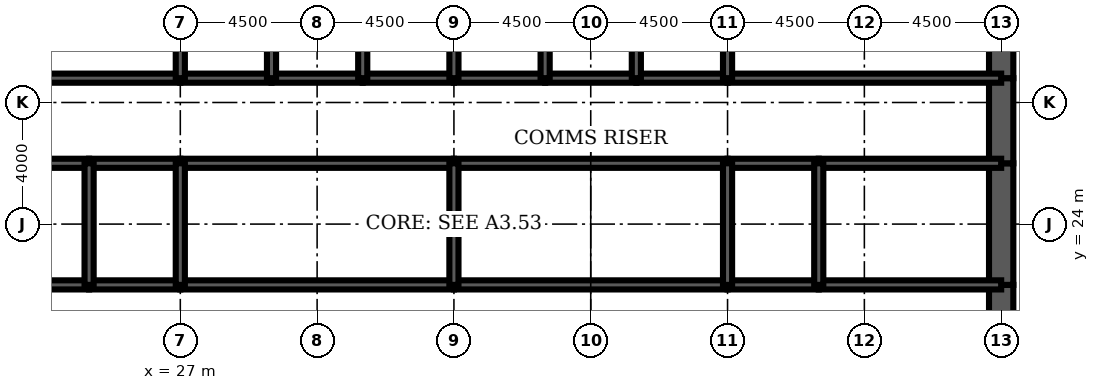
"""IFC4 building model, lengths in metres.
Left out: names, types, materials, properties, quantities, classifications, styles, units other than length and angle.
Written with IfcOpenShell. Run it as: python <this file> out.ifc"""

import sys

from ifc_helpers import new_model, si_unit, direction, frame, frame_2d, origin, place, context, subcontext, project, spatial, rectangle, extrude, element, fill, save


model = new_model("IFC4")
c1 = context("Model", 3, precision=1e-05, world=origin(), true_north=direction((0.0, 1.0)))
c2 = subcontext(c1, "Body", "Model", "MODEL_VIEW")
j1 = project(units=[si_unit("LENGTHUNIT", "METRE"), si_unit("PLANEANGLEUNIT", "RADIAN")], contexts=[c1])
p1 = place(None, origin())
s1 = spatial("IfcSite", under=j1, at=p1, CompositionType="ELEMENT")
p2 = place(p1, origin())
s2 = spatial("IfcBuilding", under=s1, at=p2, CompositionType="ELEMENT")
p3 = place(p2, frame((0.0, 0.0, 227.8)))
s3 = spatial("IfcBuildingStorey", under=s2, at=p3, CompositionType="ELEMENT", Elevation=227.8)
p4 = place(p3, frame((54.0, 19.2, 0.0), z_axis=(0.0, 0.0, 1.0), x_axis=(0.0, 1.0, 0.0)))
e1 = element("IfcWall", 1, at=p4, inside=s3, PredefinedType="SHEAR", context=c2, shape_type="SweptSolid", body=[
    extrude(rectangle(XDim=2.8, YDim=0.8, at=frame_2d((1.4, 0.0))), origin(), (0.0, 0.0, 1.0), 4.2),
])
p5 = place(p4, frame((0.4, 0.0, 0.0)))
e2 = element("IfcOpeningElement", 2, at=p5, cuts=e1, PredefinedType="OPENING", context=c2, shape_type="SweptSolid", body=[
    extrude(rectangle(XDim=1.8, YDim=2.1, at=frame_2d((0.9, 1.05))), frame((0.0, 0.41, 0.0), z_axis=(0.0, -1.0, 0.0), x_axis=(1.0, 0.0, 0.0)), (0.0, 0.0, 1.0), 0.82),
])
p6 = place(p3, frame((54.0, 22.0, 0.0), z_axis=(0.0, 0.0, 1.0), x_axis=(0.0, 1.0, 0.0)))
e3 = element("IfcWall", 3, at=p6, inside=s3, PredefinedType="SHEAR", context=c2, shape_type="SweptSolid", body=[
    extrude(rectangle(XDim=4.0, YDim=0.8, at=frame_2d((2.0, 0.0))), origin(), (0.0, 0.0, 1.0), 4.2),
])
p7 = place(p3, frame((54.0, 26.0, 0.0), z_axis=(0.0, 0.0, 1.0), x_axis=(0.0, 1.0, 0.0)))
e4 = element("IfcWall", 4, at=p7, inside=s3, PredefinedType="SHEAR", context=c2, shape_type="SweptSolid", body=[
    extrude(rectangle(XDim=2.8, YDim=0.8, at=frame_2d((1.4, 0.0))), origin(), (0.0, 0.0, 1.0), 4.2),
])
p8 = place(p7, frame((0.6, 0.0, 0.0)))
e5 = element("IfcOpeningElement", 5, at=p8, cuts=e4, PredefinedType="OPENING", context=c2, shape_type="SweptSolid", body=[
    extrude(rectangle(XDim=1.8, YDim=2.1, at=frame_2d((0.9, 1.05))), frame((0.0, 0.41, 0.0), z_axis=(0.0, -1.0, 0.0), x_axis=(1.0, 0.0, 0.0)), (0.0, 0.0, 1.0), 0.82),
])
p9 = place(p3, frame((54.0, 28.8, 0.0), z_axis=(0.0, 0.0, 1.0), x_axis=(0.0, 1.0, 0.0)))
e6 = element("IfcWall", 6, at=p9, inside=s3, PredefinedType="SHEAR", context=c2, shape_type="SweptSolid", body=[
    extrude(rectangle(XDim=3.2, YDim=0.8, at=frame_2d((1.6, 0.0))), origin(), (0.0, 0.0, 1.0), 4.2),
])
p10 = place(p3, frame((18.0, 28.8, 0.0), z_axis=(0.0, 0.0, 1.0), x_axis=(1.0, 0.0, 0.0)))
e7 = element("IfcWall", 7, at=p10, inside=s3, PredefinedType="SOLIDWALL", context=c2, shape_type="SweptSolid", body=[
    extrude(rectangle(XDim=9.0, YDim=0.3, at=frame_2d((4.5, 0.0))), origin(), (0.0, 0.0, 1.0), 4.2),
])
p11 = place(p10, frame((0.65, 0.0, 0.0)))
e8 = element("IfcOpeningElement", 8, at=p11, cuts=e7, PredefinedType="OPENING", context=c2, shape_type="SweptSolid", body=[
    extrude(rectangle(XDim=1.0, YDim=2.1, at=frame_2d((0.5, 1.05))), frame((0.0, 0.16, 0.0), z_axis=(0.0, -1.0, 0.0), x_axis=(1.0, 0.0, 0.0)), (0.0, 0.0, 1.0), 0.32),
])
p12 = place(p3, frame((27.0, 28.8, 0.0), z_axis=(0.0, 0.0, 1.0), x_axis=(1.0, 0.0, 0.0)))
e9 = element("IfcWall", 9, at=p12, inside=s3, PredefinedType="SOLIDWALL", context=c2, shape_type="SweptSolid", body=[
    extrude(rectangle(XDim=3.0, YDim=0.3, at=frame_2d((1.5, 0.0))), origin(), (0.0, 0.0, 1.0), 4.2),
])
p13 = place(p12, frame((0.95, 0.0, 0.0)))
e10 = element("IfcOpeningElement", 10, at=p13, cuts=e9, PredefinedType="OPENING", context=c2, shape_type="SweptSolid", body=[
    extrude(rectangle(XDim=1.1, YDim=2.2, at=frame_2d((0.55, 1.1))), frame((0.0, 0.16, 0.0), z_axis=(0.0, -1.0, 0.0), x_axis=(1.0, 0.0, 0.0)), (0.0, 0.0, 1.0), 0.32),
])
p14 = place(p3, frame((30.0, 28.8, 0.0), z_axis=(0.0, 0.0, 1.0), x_axis=(1.0, 0.0, 0.0)))
e11 = element("IfcWall", 11, at=p14, inside=s3, PredefinedType="SOLIDWALL", context=c2, shape_type="SweptSolid", body=[
    extrude(rectangle(XDim=3.0, YDim=0.3, at=frame_2d((1.5, 0.0))), origin(), (0.0, 0.0, 1.0), 4.2),
])
p15 = place(p14, frame((0.95, 0.0, 0.0)))
e12 = element("IfcOpeningElement", 12, at=p15, cuts=e11, PredefinedType="OPENING", context=c2, shape_type="SweptSolid", body=[
    extrude(rectangle(XDim=1.1, YDim=2.2, at=frame_2d((0.55, 1.1))), frame((0.0, 0.16, 0.0), z_axis=(0.0, -1.0, 0.0), x_axis=(1.0, 0.0, 0.0)), (0.0, 0.0, 1.0), 0.32),
])
p16 = place(p3, frame((33.0, 28.8, 0.0), z_axis=(0.0, 0.0, 1.0), x_axis=(1.0, 0.0, 0.0)))
e13 = element("IfcWall", 13, at=p16, inside=s3, PredefinedType="SOLIDWALL", context=c2, shape_type="SweptSolid", body=[
    extrude(rectangle(XDim=3.0, YDim=0.3, at=frame_2d((1.5, 0.0))), origin(), (0.0, 0.0, 1.0), 4.2),
])
p17 = place(p16, frame((0.95, 0.0, 0.0)))
e14 = element("IfcOpeningElement", 14, at=p17, cuts=e13, PredefinedType="OPENING", context=c2, shape_type="SweptSolid", body=[
    extrude(rectangle(XDim=1.1, YDim=2.2, at=frame_2d((0.55, 1.1))), frame((0.0, 0.16, 0.0), z_axis=(0.0, -1.0, 0.0), x_axis=(1.0, 0.0, 0.0)), (0.0, 0.0, 1.0), 0.32),
])
for number, where, z_axis, x_axis in (
    (15, (36.0, 28.8, 0.0), (0.0, 0.0, 1.0), (1.0, 0.0, 0.0)),
    (16, (39.0, 28.8, 0.0), (0.0, 0.0, 1.0), (1.0, 0.0, 0.0)),
):
    element("IfcWall", number, at=place(p3, frame(where, z_axis=z_axis, x_axis=x_axis)), inside=s3, PredefinedType="SOLIDWALL", context=c2, shape_type="SweptSolid", body=[
        extrude(rectangle(XDim=3.0, YDim=0.3, at=frame_2d((1.5, 0.0))), origin(), (0.0, 0.0, 1.0), 4.2),
    ])
p18 = place(p3, frame((42.0, 28.8, 0.0), z_axis=(0.0, 0.0, 1.0), x_axis=(1.0, 0.0, 0.0)))
e17 = element("IfcWall", 17, at=p18, inside=s3, PredefinedType="SOLIDWALL", context=c2, shape_type="SweptSolid", body=[
    extrude(rectangle(XDim=3.0, YDim=0.3, at=frame_2d((1.5, 0.0))), origin(), (0.0, 0.0, 1.0), 4.2),
])
p19 = place(p18, frame((0.95, 0.0, 0.0)))
e18 = element("IfcOpeningElement", 18, at=p19, cuts=e17, PredefinedType="OPENING", context=c2, shape_type="SweptSolid", body=[
    extrude(rectangle(XDim=1.1, YDim=2.2, at=frame_2d((0.55, 1.1))), frame((0.0, 0.16, 0.0), z_axis=(0.0, -1.0, 0.0), x_axis=(1.0, 0.0, 0.0)), (0.0, 0.0, 1.0), 0.32),
])
p20 = place(p3, frame((45.0, 28.8, 0.0), z_axis=(0.0, 0.0, 1.0), x_axis=(1.0, 0.0, 0.0)))
e19 = element("IfcWall", 19, at=p20, inside=s3, PredefinedType="SOLIDWALL", context=c2, shape_type="SweptSolid", body=[
    extrude(rectangle(XDim=9.0, YDim=0.3, at=frame_2d((4.5, 0.0))), origin(), (0.0, 0.0, 1.0), 4.2),
])
p21 = place(p20, frame((7.35, 0.0, 0.0)))
e20 = element("IfcOpeningElement", 20, at=p21, cuts=e19, PredefinedType="OPENING", context=c2, shape_type="SweptSolid", body=[
    extrude(rectangle(XDim=1.0, YDim=2.1, at=frame_2d((0.5, 1.05))), frame((0.0, 0.16, 0.0), z_axis=(0.0, -1.0, 0.0), x_axis=(1.0, 0.0, 0.0)), (0.0, 0.0, 1.0), 0.32),
])
p22 = place(p3, frame((18.0, 22.0, 0.0), z_axis=(0.0, 0.0, 1.0), x_axis=(1.0, 0.0, 0.0)))
e21 = element("IfcWall", 21, at=p22, inside=s3, PredefinedType="SOLIDWALL", context=c2, shape_type="SweptSolid", body=[
    extrude(rectangle(XDim=6.0, YDim=0.3, at=frame_2d((3.0, 0.0))), origin(), (0.0, 0.0, 1.0), 4.2),
])
p23 = place(p22, frame((4.4, 0.0, 0.0)))
e22 = element("IfcOpeningElement", 22, at=p23, cuts=e21, PredefinedType="OPENING", context=c2, shape_type="SweptSolid", body=[
    extrude(rectangle(XDim=1.0, YDim=2.1, at=frame_2d((0.5, 1.05))), frame((0.0, 0.16, 0.0), z_axis=(0.0, -1.0, 0.0), x_axis=(1.0, 0.0, 0.0)), (0.0, 0.0, 1.0), 0.32),
])
p24 = place(p22, frame((0.65, 0.0, 0.0)))
e23 = element("IfcOpeningElement", 23, at=p24, cuts=e21, PredefinedType="OPENING", context=c2, shape_type="SweptSolid", body=[
    extrude(rectangle(XDim=1.0, YDim=2.1, at=frame_2d((0.5, 1.05))), frame((0.0, 0.16, 0.0), z_axis=(0.0, -1.0, 0.0), x_axis=(1.0, 0.0, 0.0)), (0.0, 0.0, 1.0), 0.32),
])
p25 = place(p3, frame((24.0, 22.0, 0.0), z_axis=(0.0, 0.0, 1.0), x_axis=(1.0, 0.0, 0.0)))
e24 = element("IfcWall", 24, at=p25, inside=s3, PredefinedType="SOLIDWALL", context=c2, shape_type="SweptSolid", body=[
    extrude(rectangle(XDim=3.0, YDim=0.3, at=frame_2d((1.5, 0.0))), origin(), (0.0, 0.0, 1.0), 4.2),
])
p26 = place(p25, frame((1.0, 0.0, 0.0)))
e25 = element("IfcOpeningElement", 25, at=p26, cuts=e24, PredefinedType="OPENING", context=c2, shape_type="SweptSolid", body=[
    extrude(rectangle(XDim=1.0, YDim=2.1, at=frame_2d((0.5, 1.05))), frame((0.0, 0.16, 0.0), z_axis=(0.0, -1.0, 0.0), x_axis=(1.0, 0.0, 0.0)), (0.0, 0.0, 1.0), 0.32),
])
p27 = place(p3, frame((27.0, 22.0, 0.0), z_axis=(0.0, 0.0, 1.0), x_axis=(1.0, 0.0, 0.0)))
e26 = element("IfcWall", 26, at=p27, inside=s3, PredefinedType="SOLIDWALL", context=c2, shape_type="SweptSolid", body=[
    extrude(rectangle(XDim=9.0, YDim=0.3, at=frame_2d((4.5, 0.0))), origin(), (0.0, 0.0, 1.0), 4.2),
])
p28 = place(p27, frame((4.0, 0.0, 0.0)))
e27 = element("IfcOpeningElement", 27, at=p28, cuts=e26, PredefinedType="OPENING", context=c2, shape_type="SweptSolid", body=[
    extrude(rectangle(XDim=1.0, YDim=2.1, at=frame_2d((0.5, 1.05))), frame((0.0, 0.16, 0.0), z_axis=(0.0, -1.0, 0.0), x_axis=(1.0, 0.0, 0.0)), (0.0, 0.0, 1.0), 0.32),
])
p29 = place(p3, frame((36.0, 22.0, 0.0), z_axis=(0.0, 0.0, 1.0), x_axis=(1.0, 0.0, 0.0)))
e28 = element("IfcWall", 28, at=p29, inside=s3, PredefinedType="SOLIDWALL", context=c2, shape_type="SweptSolid", body=[
    extrude(rectangle(XDim=9.0, YDim=0.3, at=frame_2d((4.5, 0.0))), origin(), (0.0, 0.0, 1.0), 4.2),
])
p30 = place(p29, frame((4.0, 0.0, 0.0)))
e29 = element("IfcOpeningElement", 29, at=p30, cuts=e28, PredefinedType="OPENING", context=c2, shape_type="SweptSolid", body=[
    extrude(rectangle(XDim=1.0, YDim=2.1, at=frame_2d((0.5, 1.05))), frame((0.0, 0.16, 0.0), z_axis=(0.0, -1.0, 0.0), x_axis=(1.0, 0.0, 0.0)), (0.0, 0.0, 1.0), 0.32),
])
p31 = place(p3, frame((45.0, 22.0, 0.0), z_axis=(0.0, 0.0, 1.0), x_axis=(1.0, 0.0, 0.0)))
e30 = element("IfcWall", 30, at=p31, inside=s3, PredefinedType="SOLIDWALL", context=c2, shape_type="SweptSolid", body=[
    extrude(rectangle(XDim=3.0, YDim=0.3, at=frame_2d((1.5, 0.0))), origin(), (0.0, 0.0, 1.0), 4.2),
])
p32 = place(p31, frame((1.0, 0.0, 0.0)))
e31 = element("IfcOpeningElement", 31, at=p32, cuts=e30, PredefinedType="OPENING", context=c2, shape_type="SweptSolid", body=[
    extrude(rectangle(XDim=1.0, YDim=2.1, at=frame_2d((0.5, 1.05))), frame((0.0, 0.16, 0.0), z_axis=(0.0, -1.0, 0.0), x_axis=(1.0, 0.0, 0.0)), (0.0, 0.0, 1.0), 0.32),
])
p33 = place(p3, frame((48.0, 22.0, 0.0), z_axis=(0.0, 0.0, 1.0), x_axis=(1.0, 0.0, 0.0)))
e32 = element("IfcWall", 32, at=p33, inside=s3, PredefinedType="SOLIDWALL", context=c2, shape_type="SweptSolid", body=[
    extrude(rectangle(XDim=6.0, YDim=0.3, at=frame_2d((3.0, 0.0))), origin(), (0.0, 0.0, 1.0), 4.2),
])
p34 = place(p33, frame((2.0, 0.0, 0.0)))
e33 = element("IfcOpeningElement", 33, at=p34, cuts=e32, PredefinedType="OPENING", context=c2, shape_type="SweptSolid", body=[
    extrude(rectangle(XDim=1.0, YDim=2.1, at=frame_2d((0.5, 1.05))), frame((0.0, 0.16, 0.0), z_axis=(0.0, -1.0, 0.0), x_axis=(1.0, 0.0, 0.0)), (0.0, 0.0, 1.0), 0.32),
])
p35 = place(p33, frame((4.35, 0.0, 0.0)))
e34 = element("IfcOpeningElement", 34, at=p35, cuts=e32, PredefinedType="OPENING", context=c2, shape_type="SweptSolid", body=[
    extrude(rectangle(XDim=1.0, YDim=2.1, at=frame_2d((0.5, 1.05))), frame((0.0, 0.16, 0.0), z_axis=(0.0, -1.0, 0.0), x_axis=(1.0, 0.0, 0.0)), (0.0, 0.0, 1.0), 0.32),
])
p36 = place(p3, frame((18.0, 26.0, 0.0), z_axis=(0.0, 0.0, 1.0), x_axis=(1.0, 0.0, 0.0)))
e35 = element("IfcWall", 35, at=p36, inside=s3, PredefinedType="SOLIDWALL", context=c2, shape_type="SweptSolid", body=[
    extrude(rectangle(XDim=6.0, YDim=0.3, at=frame_2d((3.0, 0.0))), origin(), (0.0, 0.0, 1.0), 4.2),
])
p37 = place(p3, frame((24.0, 26.0, 0.0), z_axis=(0.0, 0.0, 1.0), x_axis=(1.0, 0.0, 0.0)))
e36 = element("IfcWall", 36, at=p37, inside=s3, PredefinedType="SOLIDWALL", context=c2, shape_type="SweptSolid", body=[
    extrude(rectangle(XDim=3.0, YDim=0.3, at=frame_2d((1.5, 0.0))), origin(), (0.0, 0.0, 1.0), 4.2),
])
for number, where, z_axis, x_axis in (
    (37, (27.0, 26.0, 0.0), (0.0, 0.0, 1.0), (1.0, 0.0, 0.0)),
    (38, (36.0, 26.0, 0.0), (0.0, 0.0, 1.0), (1.0, 0.0, 0.0)),
):
    element("IfcWall", number, at=place(p3, frame(where, z_axis=z_axis, x_axis=x_axis)), inside=s3, PredefinedType="SOLIDWALL", context=c2, shape_type="SweptSolid", body=[
        extrude(rectangle(XDim=9.0, YDim=0.3, at=frame_2d((4.5, 0.0))), origin(), (0.0, 0.0, 1.0), 4.2),
    ])
p38 = place(p3, frame((45.0, 26.0, 0.0), z_axis=(0.0, 0.0, 1.0), x_axis=(1.0, 0.0, 0.0)))
e39 = element("IfcWall", 39, at=p38, inside=s3, PredefinedType="SOLIDWALL", context=c2, shape_type="SweptSolid", body=[
    extrude(rectangle(XDim=3.0, YDim=0.3, at=frame_2d((1.5, 0.0))), origin(), (0.0, 0.0, 1.0), 4.2),
])
p39 = place(p3, frame((48.0, 26.0, 0.0), z_axis=(0.0, 0.0, 1.0), x_axis=(1.0, 0.0, 0.0)))
e40 = element("IfcWall", 40, at=p39, inside=s3, PredefinedType="SOLIDWALL", context=c2, shape_type="SweptSolid", body=[
    extrude(rectangle(XDim=6.0, YDim=0.3, at=frame_2d((3.0, 0.0))), origin(), (0.0, 0.0, 1.0), 4.2),
])
for number, where, z_axis, x_axis in (
    (41, (27.0, 28.8, 0.0), (0.0, 0.0, 1.0), (0.0, 1.0, 0.0)),
    (42, (30.0, 28.8, 0.0), (0.0, 0.0, 1.0), (0.0, 1.0, 0.0)),
    (43, (33.0, 28.8, 0.0), (0.0, 0.0, 1.0), (0.0, 1.0, 0.0)),
    (44, (36.0, 28.8, 0.0), (0.0, 0.0, 1.0), (0.0, 1.0, 0.0)),
    (45, (39.0, 28.8, 0.0), (0.0, 0.0, 1.0), (0.0, 1.0, 0.0)),
    (46, (42.0, 28.8, 0.0), (0.0, 0.0, 1.0), (0.0, 1.0, 0.0)),
    (47, (45.0, 28.8, 0.0), (0.0, 0.0, 1.0), (0.0, 1.0, 0.0)),
):
    element("IfcWall", number, at=place(p3, frame(where, z_axis=z_axis, x_axis=x_axis)), inside=s3, PredefinedType="SOLIDWALL", context=c2, shape_type="SweptSolid", body=[
        extrude(rectangle(XDim=3.2, YDim=0.3, at=frame_2d((1.6, 0.0))), origin(), (0.0, 0.0, 1.0), 4.2),
    ])
for number, where, z_axis, x_axis in (
    (48, (24.0, 22.0, 0.0), (0.0, 0.0, 1.0), (0.0, 1.0, 0.0)),
    (49, (27.0, 22.0, 0.0), (0.0, 0.0, 1.0), (0.0, 1.0, 0.0)),
    (50, (36.0, 22.0, 0.0), (0.0, 0.0, 1.0), (0.0, 1.0, 0.0)),
    (51, (45.0, 22.0, 0.0), (0.0, 0.0, 1.0), (0.0, 1.0, 0.0)),
    (52, (48.0, 22.0, 0.0), (0.0, 0.0, 1.0), (0.0, 1.0, 0.0)),
):
    element("IfcWall", number, at=place(p3, frame(where, z_axis=z_axis, x_axis=x_axis)), inside=s3, PredefinedType="SOLIDWALL", context=c2, shape_type="SweptSolid", body=[
        extrude(rectangle(XDim=4.0, YDim=0.3, at=frame_2d((2.0, 0.0))), origin(), (0.0, 0.0, 1.0), 4.2),
    ])
p40 = place(p3, frame((42.5, 22.15, 0.0), z_axis=(0.0, 0.0, 1.0), x_axis=(0.0, 1.0, 0.0)))
e53 = element("IfcWall", 53, at=p40, inside=s3, PredefinedType="PARTITIONING", context=c2, shape_type="SweptSolid", body=[
    extrude(rectangle(XDim=3.7, YDim=0.15, at=frame_2d((1.85, 0.0))), origin(), (0.0, 0.0, 1.0), 3.0),
])
p41 = place(p40, frame((2.2, 0.0, 0.0)))
e54 = element("IfcOpeningElement", 54, at=p41, cuts=e53, PredefinedType="OPENING", context=c2, shape_type="SweptSolid", body=[
    extrude(rectangle(XDim=1.0, YDim=2.1, at=frame_2d((0.5, 1.05))), frame((0.0, 0.085, 0.0), z_axis=(0.0, -1.0, 0.0), x_axis=(1.0, 0.0, 0.0)), (0.0, 0.0, 1.0), 0.17),
])
p42 = place(p3, frame((52.025, 22.15, 0.0), z_axis=(0.0, 0.0, 1.0), x_axis=(0.0, 1.0, 0.0)))
e55 = element("IfcWall", 55, at=p42, inside=s3, PredefinedType="PARTITIONING", context=c2, shape_type="SweptSolid", body=[
    extrude(rectangle(XDim=3.7, YDim=0.15, at=frame_2d((1.85, 0.0))), origin(), (0.0, 0.0, 1.0), 3.0),
])
p43 = place(p3, frame((23.7, 26.15, 0.0), z_axis=(0.0, 0.0, 1.0), x_axis=(0.0, 1.0, 0.0)))
e56 = element("IfcWall", 56, at=p43, inside=s3, PredefinedType="PARTITIONING", context=c2, shape_type="SweptSolid", body=[
    extrude(rectangle(XDim=2.5, YDim=0.15, at=frame_2d((1.25, 0.0))), origin(), (0.0, 0.0, 1.0), 3.0),
])
p44 = place(p43, frame((0.35, 0.0, 0.0)))
e57 = element("IfcOpeningElement", 57, at=p44, cuts=e56, PredefinedType="OPENING", context=c2, shape_type="SweptSolid", body=[
    extrude(rectangle(XDim=1.0, YDim=2.1, at=frame_2d((0.5, 1.05))), frame((0.0, 0.085, 0.0), z_axis=(0.0, -1.0, 0.0), x_axis=(1.0, 0.0, 0.0)), (0.0, 0.0, 1.0), 0.17),
])
p45 = place(p41, origin())
e58 = element("IfcDoor", 58, at=p45, inside=s3, OperationType="SINGLE_SWING_RIGHT", PredefinedType="DOOR", context=c2, shape_type="SweptSolid", body=[
    extrude(rectangle(XDim=1.0, YDim=2.1, at=frame_2d((0.5, 1.05))), frame((0.0, 0.025, 0.0), z_axis=(0.0, -1.0, 0.0), x_axis=(1.0, 0.0, 0.0)), (0.0, 0.0, 1.0), 0.05),
])
fill(e54, e58)
p46 = place(p44, origin())
e59 = element("IfcDoor", 59, at=p46, inside=s3, OperationType="SINGLE_SWING_LEFT", PredefinedType="DOOR", context=c2, shape_type="SweptSolid", body=[
    extrude(rectangle(XDim=1.0, YDim=2.1, at=frame_2d((0.5, 1.05))), frame((0.0, 0.025, 0.0), z_axis=(0.0, -1.0, 0.0), x_axis=(1.0, 0.0, 0.0)), (0.0, 0.0, 1.0), 0.05),
])
fill(e57, e59)
p47 = place(p19, origin())
e60 = element("IfcDoor", 60, at=p47, inside=s3, OperationType="DOUBLE_DOOR_SLIDING", PredefinedType="USERDEFINED", context=c2, shape_type="SweptSolid", body=[
    extrude(rectangle(XDim=1.1, YDim=2.2, at=frame_2d((0.55, 1.1))), frame((0.0, 0.025, 0.0), z_axis=(0.0, -1.0, 0.0), x_axis=(1.0, 0.0, 0.0)), (0.0, 0.0, 1.0), 0.05),
])
fill(e18, e60)
p48 = place(p13, origin())
e61 = element("IfcDoor", 61, at=p48, inside=s3, OperationType="DOUBLE_DOOR_SLIDING", PredefinedType="USERDEFINED", context=c2, shape_type="SweptSolid", body=[
    extrude(rectangle(XDim=1.1, YDim=2.2, at=frame_2d((0.55, 1.1))), frame((0.0, 0.025, 0.0), z_axis=(0.0, -1.0, 0.0), x_axis=(1.0, 0.0, 0.0)), (0.0, 0.0, 1.0), 0.05),
])
fill(e10, e61)
p49 = place(p15, origin())
e62 = element("IfcDoor", 62, at=p49, inside=s3, OperationType="DOUBLE_DOOR_SLIDING", PredefinedType="USERDEFINED", context=c2, shape_type="SweptSolid", body=[
    extrude(rectangle(XDim=1.1, YDim=2.2, at=frame_2d((0.55, 1.1))), frame((0.0, 0.025, 0.0), z_axis=(0.0, -1.0, 0.0), x_axis=(1.0, 0.0, 0.0)), (0.0, 0.0, 1.0), 0.05),
])
fill(e12, e62)
p50 = place(p17, origin())
e63 = element("IfcDoor", 63, at=p50, inside=s3, OperationType="DOUBLE_DOOR_SLIDING", PredefinedType="USERDEFINED", context=c2, shape_type="SweptSolid", body=[
    extrude(rectangle(XDim=1.1, YDim=2.2, at=frame_2d((0.55, 1.1))), frame((0.0, 0.025, 0.0), z_axis=(0.0, -1.0, 0.0), x_axis=(1.0, 0.0, 0.0)), (0.0, 0.0, 1.0), 0.05),
])
fill(e14, e63)
p51 = place(p21, origin())
e64 = element("IfcDoor", 64, at=p51, inside=s3, OperationType="SINGLE_SWING_RIGHT", PredefinedType="DOOR", context=c2, shape_type="SweptSolid", body=[
    extrude(rectangle(XDim=1.0, YDim=2.1, at=frame_2d((0.5, 1.05))), frame((0.0, 0.025, 0.0), z_axis=(0.0, -1.0, 0.0), x_axis=(1.0, 0.0, 0.0)), (0.0, 0.0, 1.0), 0.05),
])
fill(e20, e64)
p52 = place(p5, origin())
e65 = element("IfcDoor", 65, at=p52, inside=s3, OperationType="SINGLE_SWING_LEFT", PredefinedType="DOOR", context=c2, shape_type="SweptSolid", body=[
    extrude(rectangle(XDim=1.8, YDim=2.1, at=frame_2d((0.9, 1.05))), frame((0.0, 0.4, 0.0), z_axis=(0.0, -1.0, 0.0), x_axis=(1.0, 0.0, 0.0)), (0.0, 0.0, 1.0), 0.8),
])
fill(e2, e65)
p53 = place(p8, origin())
e66 = element("IfcDoor", 66, at=p53, inside=s3, OperationType="SINGLE_SWING_LEFT", PredefinedType="DOOR", context=c2, shape_type="SweptSolid", body=[
    extrude(rectangle(XDim=1.8, YDim=2.1, at=frame_2d((0.9, 1.05))), frame((0.0, 0.4, 0.0), z_axis=(0.0, -1.0, 0.0), x_axis=(1.0, 0.0, 0.0)), (0.0, 0.0, 1.0), 0.8),
])
fill(e5, e66)
p54 = place(p23, origin())
e67 = element("IfcDoor", 67, at=p54, inside=s3, OperationType="SINGLE_SWING_RIGHT", PredefinedType="DOOR", context=c2, shape_type="SweptSolid", body=[
    extrude(rectangle(XDim=1.0, YDim=2.1, at=frame_2d((0.5, 1.05))), frame((0.0, 0.025, 0.0), z_axis=(0.0, -1.0, 0.0), x_axis=(1.0, 0.0, 0.0)), (0.0, 0.0, 1.0), 0.05),
])
fill(e22, e67)
p55 = place(p26, origin())
e68 = element("IfcDoor", 68, at=p55, inside=s3, OperationType="SINGLE_SWING_LEFT", PredefinedType="DOOR", context=c2, shape_type="SweptSolid", body=[
    extrude(rectangle(XDim=1.0, YDim=2.1, at=frame_2d((0.5, 1.05))), frame((0.0, 0.025, 0.0), z_axis=(0.0, -1.0, 0.0), x_axis=(1.0, 0.0, 0.0)), (0.0, 0.0, 1.0), 0.05),
])
fill(e25, e68)
p56 = place(p28, origin())
e69 = element("IfcDoor", 69, at=p56, inside=s3, OperationType="SINGLE_SWING_LEFT", PredefinedType="DOOR", context=c2, shape_type="SweptSolid", body=[
    extrude(rectangle(XDim=1.0, YDim=2.1, at=frame_2d((0.5, 1.05))), frame((0.0, 0.025, 0.0), z_axis=(0.0, -1.0, 0.0), x_axis=(1.0, 0.0, 0.0)), (0.0, 0.0, 1.0), 0.05),
])
fill(e27, e69)
p57 = place(p30, origin())
e70 = element("IfcDoor", 70, at=p57, inside=s3, OperationType="SINGLE_SWING_LEFT", PredefinedType="DOOR", context=c2, shape_type="SweptSolid", body=[
    extrude(rectangle(XDim=1.0, YDim=2.1, at=frame_2d((0.5, 1.05))), frame((0.0, 0.025, 0.0), z_axis=(0.0, -1.0, 0.0), x_axis=(1.0, 0.0, 0.0)), (0.0, 0.0, 1.0), 0.05),
])
fill(e29, e70)
p58 = place(p32, origin())
e71 = element("IfcDoor", 71, at=p58, inside=s3, OperationType="SINGLE_SWING_LEFT", PredefinedType="DOOR", context=c2, shape_type="SweptSolid", body=[
    extrude(rectangle(XDim=1.0, YDim=2.1, at=frame_2d((0.5, 1.05))), frame((0.0, 0.025, 0.0), z_axis=(0.0, -1.0, 0.0), x_axis=(1.0, 0.0, 0.0)), (0.0, 0.0, 1.0), 0.05),
])
fill(e31, e71)
p59 = place(p34, origin())
e72 = element("IfcDoor", 72, at=p59, inside=s3, OperationType="SINGLE_SWING_LEFT", PredefinedType="DOOR", context=c2, shape_type="SweptSolid", body=[
    extrude(rectangle(XDim=1.0, YDim=2.1, at=frame_2d((0.5, 1.05))), frame((0.0, 0.025, 0.0), z_axis=(0.0, -1.0, 0.0), x_axis=(1.0, 0.0, 0.0)), (0.0, 0.0, 1.0), 0.05),
])
fill(e33, e72)
p60 = place(p35, origin())
e73 = element("IfcDoor", 73, at=p60, inside=s3, OperationType="SINGLE_SWING_RIGHT", PredefinedType="DOOR", context=c2, shape_type="SweptSolid", body=[
    extrude(rectangle(XDim=1.0, YDim=2.1, at=frame_2d((0.5, 1.05))), frame((0.0, 0.025, 0.0), z_axis=(0.0, -1.0, 0.0), x_axis=(1.0, 0.0, 0.0)), (0.0, 0.0, 1.0), 0.05),
])
fill(e34, e73)
save(model, sys.argv[1])
